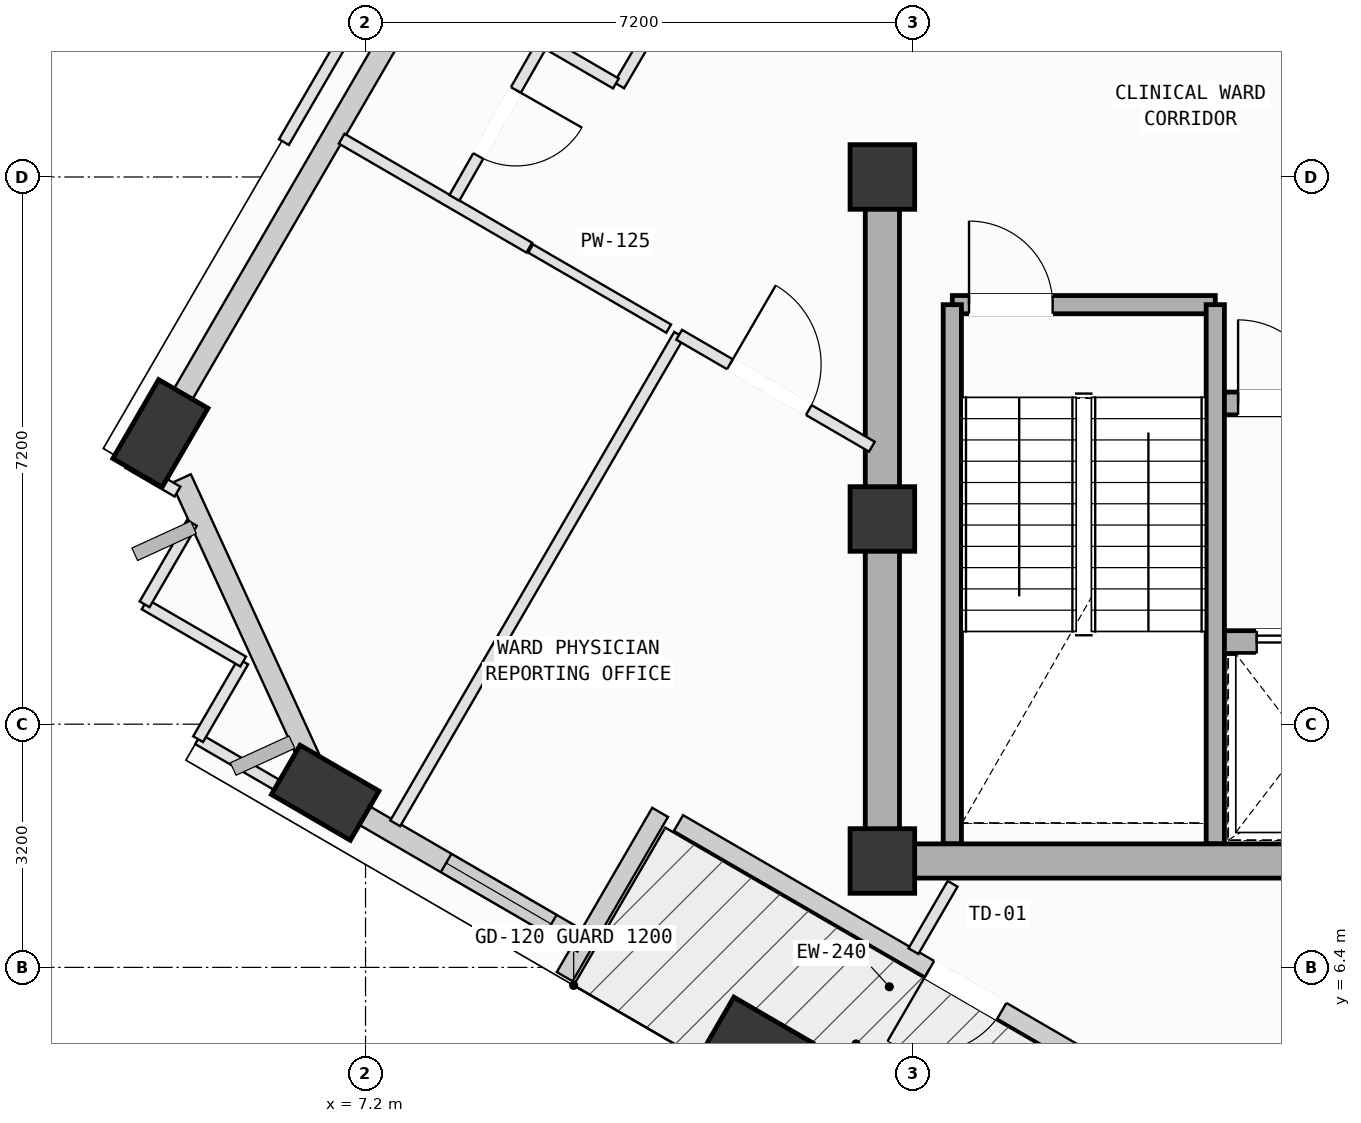
"""IFC4 building model, lengths in metres.
Left out: names, types, materials, properties, quantities, classifications, styles, units other than length and angle.
Written with IfcOpenShell. Run it as: python <this file> out.ifc"""

import sys

from ifc_helpers import new_model, si_unit, direction, frame, frame_2d, origin, origin_2d, place, context, subcontext, project, spatial, rectangle, extrude, element, fill, save


model = new_model("IFC4")
c1 = context("Model", 3, precision=1e-05, world=origin(), true_north=direction((0.0, 1.0)))
c2 = subcontext(c1, "Body", "Model", "MODEL_VIEW")
j1 = project(units=[si_unit("LENGTHUNIT", "METRE"), si_unit("PLANEANGLEUNIT", "RADIAN")], contexts=[c1])
p1 = place(None, origin())
s1 = spatial("IfcSite", under=j1, at=p1, CompositionType="ELEMENT")
p2 = place(p1, origin())
s2 = spatial("IfcBuilding", under=s1, at=p2, CompositionType="ELEMENT")
p3 = place(p2, frame((0.0, 0.0, 280.6)))
s3 = spatial("IfcBuildingStorey", under=s2, at=p3, CompositionType="ELEMENT", Elevation=280.6)
for number, where, z_axis, x_axis in (
    (1, (14.0, 7.8, 0.0), (0.0, 0.0, 1.0), (1.0, 0.0, 0.0)),
    (2, (14.0, 12.3, 0.0), (0.0, 0.0, 1.0), (1.0, 0.0, 0.0)),
    (3, (14.0, 16.8, 0.0), (0.0, 0.0, 1.0), (1.0, 0.0, 0.0)),
):
    element("IfcColumn", number, at=place(p3, frame(where, z_axis=z_axis, x_axis=x_axis)), inside=s3, PredefinedType="COLUMN", context=c2, shape_type="SweptSolid", body=[
        extrude(rectangle(XDim=0.85, YDim=0.85, at=origin_2d()), origin(), (0.0, 0.0, 1.0), 4.0),
    ])
p4 = place(p3, frame((4.501, 13.427, 0.002), z_axis=(0.047741083689, -0.11923153896, 0.991718018917), x_axis=(0.147510708326, 0.982805432518, 0.111058870611)))
e4 = element("IfcColumn", 4, at=p4, inside=s3, PredefinedType="COLUMN", context=c2, shape_type="SweptSolid", body=[
    extrude(rectangle(XDim=1.2, YDim=0.75, at=origin_2d()), origin(), (0.0, 0.0, 1.0), 4.03),
])
p5 = place(p3, frame((6.669, 8.698, 0.002), z_axis=(0.067123543714, -0.110135922809, 0.991647370987), x_axis=(-0.997593462831, -0.024711057687, 0.064781529351)))
e5 = element("IfcColumn", 5, at=p5, inside=s3, PredefinedType="COLUMN", context=c2, shape_type="SweptSolid", body=[
    extrude(rectangle(XDim=1.2, YDim=0.75, at=origin_2d()), origin(), (0.0, 0.0, 1.0), 4.03),
])
p6 = place(p3, frame((12.376, 5.383, 0.002), z_axis=(0.080618732892, -0.086745513947, 0.992963159295), x_axis=(-0.972922831378, -0.223345648991, 0.059480124922)))
e6 = element("IfcColumn", 6, at=p6, inside=s3, PredefinedType="COLUMN", context=c2, shape_type="SweptSolid", body=[
    extrude(rectangle(XDim=1.2, YDim=0.75, at=origin_2d()), origin(), (0.0, 0.0, 1.0), 4.025),
])
p7 = place(p3, frame((17.336, 4.803, 0.0), z_axis=(0.0, 0.0, 1.0), x_axis=(-0.86470491137, 0.502280216864, 0.0)))
e7 = element("IfcWall", 7, at=p7, inside=s3, PredefinedType="SOLIDWALL", context=c2, shape_type="SweptSolid", body=[
    extrude(rectangle(XDim=6.96, YDim=0.24, at=frame_2d((3.48, 0.0))), origin(), (0.0, 0.0, 1.0), 3.265),
])
p8 = place(p7, frame((2.04, 0.0, 0.0)))
e8 = element("IfcOpeningElement", 8, at=p8, cuts=e7, PredefinedType="OPENING", context=c2, shape_type="SweptSolid", body=[
    extrude(rectangle(XDim=1.1, YDim=2.15, at=frame_2d((0.55, 1.075))), frame((0.0, 0.13, 0.0), z_axis=(0.0, -1.0, 0.0), x_axis=(1.0, 0.0, 0.0)), (0.0, 0.0, 1.0), 0.26),
])
p9 = place(p3, frame((11.076, 8.44, 0.0), z_axis=(0.0, 0.0, 1.0), x_axis=(-0.50223681618, -0.864730120022, 0.0)))
e9 = element("IfcWall", 9, at=p9, inside=s3, PredefinedType="SOLIDWALL", context=c2, shape_type="SweptSolid", body=[
    extrude(rectangle(XDim=2.5, YDim=0.24, at=frame_2d((1.25, 0.0))), origin(), (0.0, 0.0, 1.0), 3.265),
])
p10 = place(p3, frame((4.592, 13.584, 0.0), z_axis=(0.0, 0.0, 1.0), x_axis=(0.502274010262, 0.864708516562, 0.0)))
e10 = element("IfcWall", 10, at=p10, inside=s3, PredefinedType="SOLIDWALL", context=c2, shape_type="SweptSolid", body=[
    extrude(rectangle(XDim=7.485, YDim=0.28, at=frame_2d((3.742, 0.0))), origin(), (0.0, 0.0, 1.0), 3.265),
])
p11 = place(p3, frame((6.612, 8.823, 0.0), z_axis=(0.0, 0.0, 1.0), x_axis=(-0.41676340923, 0.909014994776, 0.0)))
e11 = element("IfcWall", 11, at=p11, inside=s3, PredefinedType="SOLIDWALL", context=c2, shape_type="SweptSolid", body=[
    extrude(rectangle(XDim=4.408, YDim=0.28, at=frame_2d((2.204, 0.0))), origin(), (0.0, 0.0, 1.0), 3.265),
])
p12 = place(p3, frame((10.059, 6.729, 0.0), z_axis=(0.0, 0.0, 1.0), x_axis=(-0.864725986207, 0.502243933541, 0.0)))
e12 = element("IfcWall", 12, at=p12, inside=s3, PredefinedType="SOLIDWALL", context=c2, shape_type="SweptSolid", body=[
    extrude(rectangle(XDim=3.314, YDim=0.28, at=frame_2d((1.657, 0.0))), origin(), (0.0, 0.0, 1.0), 3.245),
])
p13 = place(p12, frame((0.48, 0.0, 0.75)))
e13 = element("IfcOpeningElement", 13, at=p13, cuts=e12, PredefinedType="OPENING", context=c2, shape_type="SweptSolid", body=[
    extrude(rectangle(XDim=1.6, YDim=1.95, at=frame_2d((0.8, 0.975))), frame((0.0, 0.15, 0.0), z_axis=(0.0, -1.0, 0.0), x_axis=(1.0, 0.0, 0.0)), (0.0, 0.0, 1.0), 0.3),
])
p14 = place(p3, frame((14.92, 15.12, 0.0), z_axis=(0.0, 0.0, 1.0), x_axis=(1.0, 0.0, 0.0)))
e14 = element("IfcWall", 14, at=p14, inside=s3, PredefinedType="SOLIDWALL", context=c2, shape_type="SweptSolid", body=[
    extrude(rectangle(XDim=3.46, YDim=0.24, at=frame_2d((1.73, 0.0))), origin(), (0.0, 0.0, 1.0), 3.78),
])
p15 = place(p14, frame((0.22, 0.0, 0.0)))
e15 = element("IfcOpeningElement", 15, at=p15, cuts=e14, PredefinedType="OPENING", context=c2, shape_type="SweptSolid", body=[
    extrude(rectangle(XDim=1.1, YDim=2.15, at=frame_2d((0.55, 1.075))), frame((0.0, 0.13, 0.0), z_axis=(0.0, -1.0, 0.0), x_axis=(1.0, 0.0, 0.0)), (0.0, 0.0, 1.0), 0.26),
])
for number, where, z_axis, x_axis in (
    (16, (18.38, 15.12, 0.0), (0.0, 0.0, 1.0), (0.0, -1.0, 0.0)),
    (17, (14.92, 8.025, 0.0), (0.0, 0.0, 1.0), (0.0, 1.0, 0.0)),
):
    element("IfcWall", number, at=place(p3, frame(where, z_axis=z_axis, x_axis=x_axis)), inside=s3, PredefinedType="SOLIDWALL", context=c2, shape_type="SweptSolid", body=[
        extrude(rectangle(XDim=7.095, YDim=0.24, at=frame_2d((3.548, 0.0))), origin(), (0.0, 0.0, 1.0), 3.78),
    ])
p16 = place(p3, frame((14.0, 7.8, 0.0), z_axis=(0.0, 0.0, 1.0), x_axis=(1.0, 0.0, 0.0)))
e18 = element("IfcWall", 18, at=p16, inside=s3, PredefinedType="SHEAR", context=c2, shape_type="SweptSolid", body=[
    extrude(rectangle(XDim=10.8, YDim=0.45, at=frame_2d((5.4, 0.0))), origin(), (0.0, 0.0, 1.0), 3.78),
])
p17 = place(p3, frame((14.0, 16.8, 0.0), z_axis=(0.0, 0.0, 1.0), x_axis=(0.0, -1.0, 0.0)))
e19 = element("IfcWall", 19, at=p17, inside=s3, PredefinedType="SHEAR", context=c2, shape_type="SweptSolid", body=[
    extrude(rectangle(XDim=9.0, YDim=0.45, at=frame_2d((4.5, 0.0))), origin(), (0.0, 0.0, 1.0), 3.78),
])
p18 = place(p3, frame((18.5, 10.68, 0.0), z_axis=(0.0, 0.0, 1.0), x_axis=(1.0, 0.0, 0.0)))
e20 = element("IfcWall", 20, at=p18, inside=s3, PredefinedType="SOLIDWALL", context=c2, shape_type="SweptSolid", body=[
    extrude(rectangle(XDim=5.3, YDim=0.3, at=frame_2d((2.65, 0.0))), origin(), (0.0, 0.0, 1.0), 3.78),
])
p19 = place(p18, frame((4.22, 0.0, 0.0)))
e21 = element("IfcOpeningElement", 21, at=p19, cuts=e20, PredefinedType="OPENING", context=c2, shape_type="SweptSolid", body=[
    extrude(rectangle(XDim=0.86, YDim=2.06, at=frame_2d((0.43, 1.03))), frame((0.0, 0.16, 0.0), z_axis=(0.0, -1.0, 0.0), x_axis=(1.0, 0.0, 0.0)), (0.0, 0.0, 1.0), 0.32),
])
p20 = place(p18, frame((0.425, 0.0, 0.0)))
e22 = element("IfcOpeningElement", 22, at=p20, cuts=e20, PredefinedType="OPENING", context=c2, shape_type="SweptSolid", body=[
    extrude(rectangle(XDim=1.25, YDim=2.18, at=frame_2d((0.625, 1.09))), frame((0.0, 0.16, 0.0), z_axis=(0.0, -1.0, 0.0), x_axis=(1.0, 0.0, 0.0)), (0.0, 0.0, 1.0), 0.32),
])
p21 = place(p18, frame((2.525, 0.0, 0.0)))
e23 = element("IfcOpeningElement", 23, at=p21, cuts=e20, PredefinedType="OPENING", context=c2, shape_type="SweptSolid", body=[
    extrude(rectangle(XDim=1.25, YDim=2.18, at=frame_2d((0.625, 1.09))), frame((0.0, 0.16, 0.0), z_axis=(0.0, -1.0, 0.0), x_axis=(1.0, 0.0, 0.0)), (0.0, 0.0, 1.0), 0.32),
])
p22 = place(p3, frame((18.5, 13.82, 0.0), z_axis=(0.0, 0.0, 1.0), x_axis=(1.0, 0.0, 0.0)))
e24 = element("IfcWall", 24, at=p22, inside=s3, PredefinedType="SOLIDWALL", context=c2, shape_type="SweptSolid", body=[
    extrude(rectangle(XDim=5.3, YDim=0.3, at=frame_2d((2.65, 0.0))), origin(), (0.0, 0.0, 1.0), 3.78),
])
p23 = place(p22, frame((0.18, 0.0, 0.0)))
e25 = element("IfcOpeningElement", 25, at=p23, cuts=e24, PredefinedType="OPENING", context=c2, shape_type="SweptSolid", body=[
    extrude(rectangle(XDim=1.1, YDim=2.15, at=frame_2d((0.55, 1.075))), frame((0.0, 0.16, 0.0), z_axis=(0.0, -1.0, 0.0), x_axis=(1.0, 0.0, 0.0)), (0.0, 0.0, 1.0), 0.32),
])
p24 = place(p3, frame((19.179, 1.565, 0.0), z_axis=(0.0, 0.0, 1.0), x_axis=(0.502212365781, 0.864744320396, 0.0)))
e26 = element("IfcWall", 26, at=p24, inside=s3, PredefinedType="PARTITIONING", context=c2, shape_type="SweptSolid", body=[
    extrude(rectangle(XDim=7.051, YDim=0.15, at=frame_2d((3.525, 0.0))), origin(), (0.0, 0.0, 1.0), 3.78),
])
p25 = place(p3, frame((7.591, 8.295, 0.0), z_axis=(0.0, 0.0, 1.0), x_axis=(0.502314529321, 0.864684979419, 0.0)))
e27 = element("IfcWall", 27, at=p25, inside=s3, PredefinedType="PARTITIONING", context=c2, shape_type="SweptSolid", body=[
    extrude(rectangle(XDim=7.435, YDim=0.15, at=frame_2d((3.718, 0.0))), origin(), (0.0, 0.0, 1.0), 3.78),
])
p26 = place(p3, frame((11.326, 14.724, 0.0), z_axis=(0.0, 0.0, 1.0), x_axis=(0.864707313678, -0.502276081126, 0.0)))
e28 = element("IfcWall", 28, at=p26, inside=s3, PredefinedType="PARTITIONING", context=c2, shape_type="SweptSolid", body=[
    extrude(rectangle(XDim=2.933, YDim=0.15, at=frame_2d((1.466, 0.0))), origin(), (0.0, 0.0, 1.0), 3.78),
])
p27 = place(p26, frame((0.773, 0.0, 0.0)))
e29 = element("IfcOpeningElement", 29, at=p27, cuts=e28, PredefinedType="OPENING", context=c2, shape_type="SweptSolid", body=[
    extrude(rectangle(XDim=1.2, YDim=2.15, at=frame_2d((0.6, 1.075))), frame((0.0, 0.085, 0.0), z_axis=(0.0, -1.0, 0.0), x_axis=(1.0, 0.0, 0.0)), (0.0, 0.0, 1.0), 0.17),
])
p28 = place(p3, frame((14.924, 7.5, 0.0), z_axis=(0.0, 0.0, 1.0), x_axis=(-0.502641159328, -0.864495150333, 0.0)))
e30 = element("IfcWall", 30, at=p28, inside=s3, PredefinedType="PARTITIONING", context=c2, shape_type="SweptSolid", body=[
    extrude(rectangle(XDim=1.025, YDim=0.15, at=frame_2d((0.512, 0.0))), origin(), (0.0, 0.0, 1.0), 3.78),
])
p29 = place(p3, frame((4.726, 12.66, 0.0), z_axis=(0.0, 0.0, 1.0), x_axis=(-0.86430974307, 0.502959906984, 0.0)))
e31 = element("IfcWall", 31, at=p29, inside=s3, PredefinedType="PARTITIONING", context=c2, shape_type="SweptSolid", body=[
    extrude(rectangle(XDim=0.75, YDim=0.15, at=frame_2d((0.375, 0.0))), origin(), (0.0, 0.0, 1.0), 3.78),
])
p30 = place(p3, frame((4.078, 13.037, 0.0), z_axis=(0.0, 0.0, 1.0), x_axis=(0.502457864187, 0.864601697151, 0.0)))
e32 = element("IfcWall", 32, at=p30, inside=s3, PredefinedType="PARTITIONING", context=c2, shape_type="SweptSolid", body=[
    extrude(rectangle(XDim=0.731, YDim=0.15, at=frame_2d((0.365, 0.0))), origin(), (0.0, 0.0, 1.0), 3.78),
])
p31 = place(p3, frame((6.886, 17.304, 0.0), z_axis=(0.0, 0.0, 1.0), x_axis=(0.864667908534, -0.502343914019, 0.0)))
e33 = element("IfcWall", 33, at=p31, inside=s3, PredefinedType="PARTITIONING", context=c2, shape_type="SweptSolid", body=[
    extrude(rectangle(XDim=2.854, YDim=0.15, at=frame_2d((1.427, 0.0))), origin(), (0.0, 0.0, 1.0), 3.78),
])
p32 = place(p3, frame((7.078, 8.194, 0.0), z_axis=(0.0, 0.0, 1.0), x_axis=(-0.864649647981, 0.502375343987, 0.0)))
e34 = element("IfcWall", 34, at=p32, inside=s3, PredefinedType="PARTITIONING", context=c2, shape_type="SweptSolid", body=[
    extrude(rectangle(XDim=2.406, YDim=0.15, at=frame_2d((1.203, 0.0))), origin(), (0.0, 0.0, 1.0), 3.245),
])
p33 = place(p3, frame((4.997, 9.403, 0.0), z_axis=(0.0, 0.0, 1.0), x_axis=(0.502250243509, 0.864722321266, 0.0)))
e35 = element("IfcWall", 35, at=p33, inside=s3, PredefinedType="PARTITIONING", context=c2, shape_type="SweptSolid", body=[
    extrude(rectangle(XDim=1.181, YDim=0.15, at=frame_2d((0.59, 0.0))), origin(), (0.0, 0.0, 1.0), 3.78),
])
p34 = place(p3, frame((5.59, 10.424, 0.0), z_axis=(0.0, 0.0, 1.0), x_axis=(-0.864857344758, 0.502017702096, 0.0)))
e36 = element("IfcWall", 36, at=p34, inside=s3, PredefinedType="PARTITIONING", context=c2, shape_type="SweptSolid", body=[
    extrude(rectangle(XDim=1.5, YDim=0.15, at=frame_2d((0.75, 0.0))), origin(), (0.0, 0.0, 1.0), 3.78),
])
p35 = place(p3, frame((4.293, 11.177, 0.0), z_axis=(0.0, 0.0, 1.0), x_axis=(0.502240128537, 0.86472819619, 0.0)))
e37 = element("IfcWall", 37, at=p35, inside=s3, PredefinedType="PARTITIONING", context=c2, shape_type="SweptSolid", body=[
    extrude(rectangle(XDim=1.239, YDim=0.15, at=frame_2d((0.619, 0.0))), origin(), (0.0, 0.0, 1.0), 3.78),
])
p36 = place(p3, frame((9.372, 15.859, 0.0), z_axis=(0.0, 0.0, 1.0), x_axis=(0.864881773896, -0.501975614131, 0.0)))
e38 = element("IfcWall", 38, at=p36, inside=s3, PredefinedType="PARTITIONING", context=c2, shape_type="SweptSolid", body=[
    extrude(rectangle(XDim=2.1, YDim=0.125, at=frame_2d((1.05, 0.0))), origin(), (0.0, 0.0, 1.0), 3.78),
])
p37 = place(p3, frame((11.378, 19.443, 0.0), z_axis=(0.0, 0.0, 1.0), x_axis=(-0.504699947851, -0.863294829498, 0.0)))
e39 = element("IfcWall", 39, at=p37, inside=s3, PredefinedType="PARTITIONING", context=c2, shape_type="SweptSolid", body=[
    extrude(rectangle(XDim=1.666, YDim=0.15, at=frame_2d((0.833, 0.0))), origin(), (0.0, 0.0, 1.0), 3.78),
])
p38 = place(p3, frame((10.494, 18.03, 0.0), z_axis=(0.0, 0.0, 1.0), x_axis=(-0.864715714853, 0.502261617572, 0.0)))
e40 = element("IfcWall", 40, at=p38, inside=s3, PredefinedType="PARTITIONING", context=c2, shape_type="SweptSolid", body=[
    extrude(rectangle(XDim=2.756, YDim=0.15, at=frame_2d((1.378, 0.0))), origin(), (0.0, 0.0, 1.0), 3.78),
])
p39 = place(p3, frame((9.492, 18.496, 0.0), z_axis=(0.0, 0.0, 1.0), x_axis=(-0.495025964314, -0.868878181712, 0.0)))
e41 = element("IfcWall", 41, at=p39, inside=s3, PredefinedType="PARTITIONING", context=c2, shape_type="SweptSolid", body=[
    extrude(rectangle(XDim=2.269, YDim=0.15, at=frame_2d((1.134, 0.0))), origin(), (0.0, 0.0, 1.0), 3.78),
])
p40 = place(p39, frame((0.634, 0.0, 0.0)))
e42 = element("IfcOpeningElement", 42, at=p40, cuts=e41, PredefinedType="OPENING", context=c2, shape_type="SweptSolid", body=[
    extrude(rectangle(XDim=1.0, YDim=2.12, at=frame_2d((0.5, 1.06))), frame((0.0, 0.085, 0.0), z_axis=(0.0, -1.0, 0.0), x_axis=(1.0, 0.0, 0.0)), (0.0, 0.0, 1.0), 0.17),
])
p41 = place(p3, frame((6.126, 17.259, 0.0), z_axis=(0.0, 0.0, 1.0), x_axis=(0.502246830531, 0.864724303591, 0.0)))
e43 = element("IfcWall", 43, at=p41, inside=s3, PredefinedType="PARTITIONING", context=c2, shape_type="SweptSolid", body=[
    extrude(rectangle(XDim=6.19, YDim=0.15, at=frame_2d((3.095, 0.0))), origin(), (0.0, 0.0, 1.0), 3.78),
])
p42 = place(p8, origin())
e44 = element("IfcDoor", 44, at=p42, inside=s3, OperationType="SINGLE_SWING_RIGHT", PredefinedType="DOOR", context=c2, shape_type="SweptSolid", body=[
    extrude(rectangle(XDim=1.1, YDim=2.15, at=frame_2d((0.55, 1.075))), frame((0.0, 0.025, 0.0), z_axis=(0.0, -1.0, 0.0), x_axis=(1.0, 0.0, 0.0)), (0.0, 0.0, 1.0), 0.05),
])
fill(e8, e44)
p43 = place(p13, origin())
e45 = element("IfcWindow", 45, at=p43, inside=s3, PartitioningType="SINGLE_PANEL", PredefinedType="WINDOW", context=c2, shape_type="SweptSolid", body=[
    extrude(rectangle(XDim=1.6, YDim=1.95, at=frame_2d((0.8, 0.975))), frame((0.0, 0.03, 0.0), z_axis=(0.0, -1.0, 0.0), x_axis=(1.0, 0.0, 0.0)), (0.0, 0.0, 1.0), 0.06),
])
fill(e13, e45)
p44 = place(p15, origin())
e46 = element("IfcDoor", 46, at=p44, inside=s3, OperationType="SINGLE_SWING_LEFT", PredefinedType="DOOR", context=c2, shape_type="SweptSolid", body=[
    extrude(rectangle(XDim=1.1, YDim=2.15, at=frame_2d((0.55, 1.075))), frame((0.0, 0.025, 0.0), z_axis=(0.0, -1.0, 0.0), x_axis=(1.0, 0.0, 0.0)), (0.0, 0.0, 1.0), 0.05),
])
fill(e15, e46)
p45 = place(p23, origin())
e47 = element("IfcDoor", 47, at=p45, inside=s3, OperationType="SINGLE_SWING_LEFT", PredefinedType="DOOR", context=c2, shape_type="SweptSolid", body=[
    extrude(rectangle(XDim=1.1, YDim=2.15, at=frame_2d((0.55, 1.075))), frame((0.0, 0.025, 0.0), z_axis=(0.0, -1.0, 0.0), x_axis=(1.0, 0.0, 0.0)), (0.0, 0.0, 1.0), 0.05),
])
fill(e25, e47)
p46 = place(p20, origin())
e48 = element("IfcDoor", 48, at=p46, inside=s3, OperationType="DOUBLE_DOOR_SLIDING", PredefinedType="DOOR", context=c2, shape_type="SweptSolid", body=[
    extrude(rectangle(XDim=1.25, YDim=2.18, at=frame_2d((0.625, 1.09))), frame((0.0, 0.025, 0.0), z_axis=(0.0, -1.0, 0.0), x_axis=(1.0, 0.0, 0.0)), (0.0, 0.0, 1.0), 0.05),
])
fill(e22, e48)
p47 = place(p27, origin())
e49 = element("IfcDoor", 49, at=p47, inside=s3, OperationType="SINGLE_SWING_LEFT", PredefinedType="DOOR", context=c2, shape_type="SweptSolid", body=[
    extrude(rectangle(XDim=1.2, YDim=2.15, at=frame_2d((0.6, 1.075))), frame((0.0, 0.025, 0.0), z_axis=(0.0, -1.0, 0.0), x_axis=(1.0, 0.0, 0.0)), (0.0, 0.0, 1.0), 0.05),
])
fill(e29, e49)
p48 = place(p40, origin())
e50 = element("IfcDoor", 50, at=p48, inside=s3, OperationType="SINGLE_SWING_LEFT", PredefinedType="DOOR", context=c2, shape_type="SweptSolid", body=[
    extrude(rectangle(XDim=1.0, YDim=2.12, at=frame_2d((0.5, 1.06))), frame((0.0, 0.025, 0.0), z_axis=(0.0, -1.0, 0.0), x_axis=(1.0, 0.0, 0.0)), (0.0, 0.0, 1.0), 0.05),
])
fill(e42, e50)
save(model, sys.argv[1])
